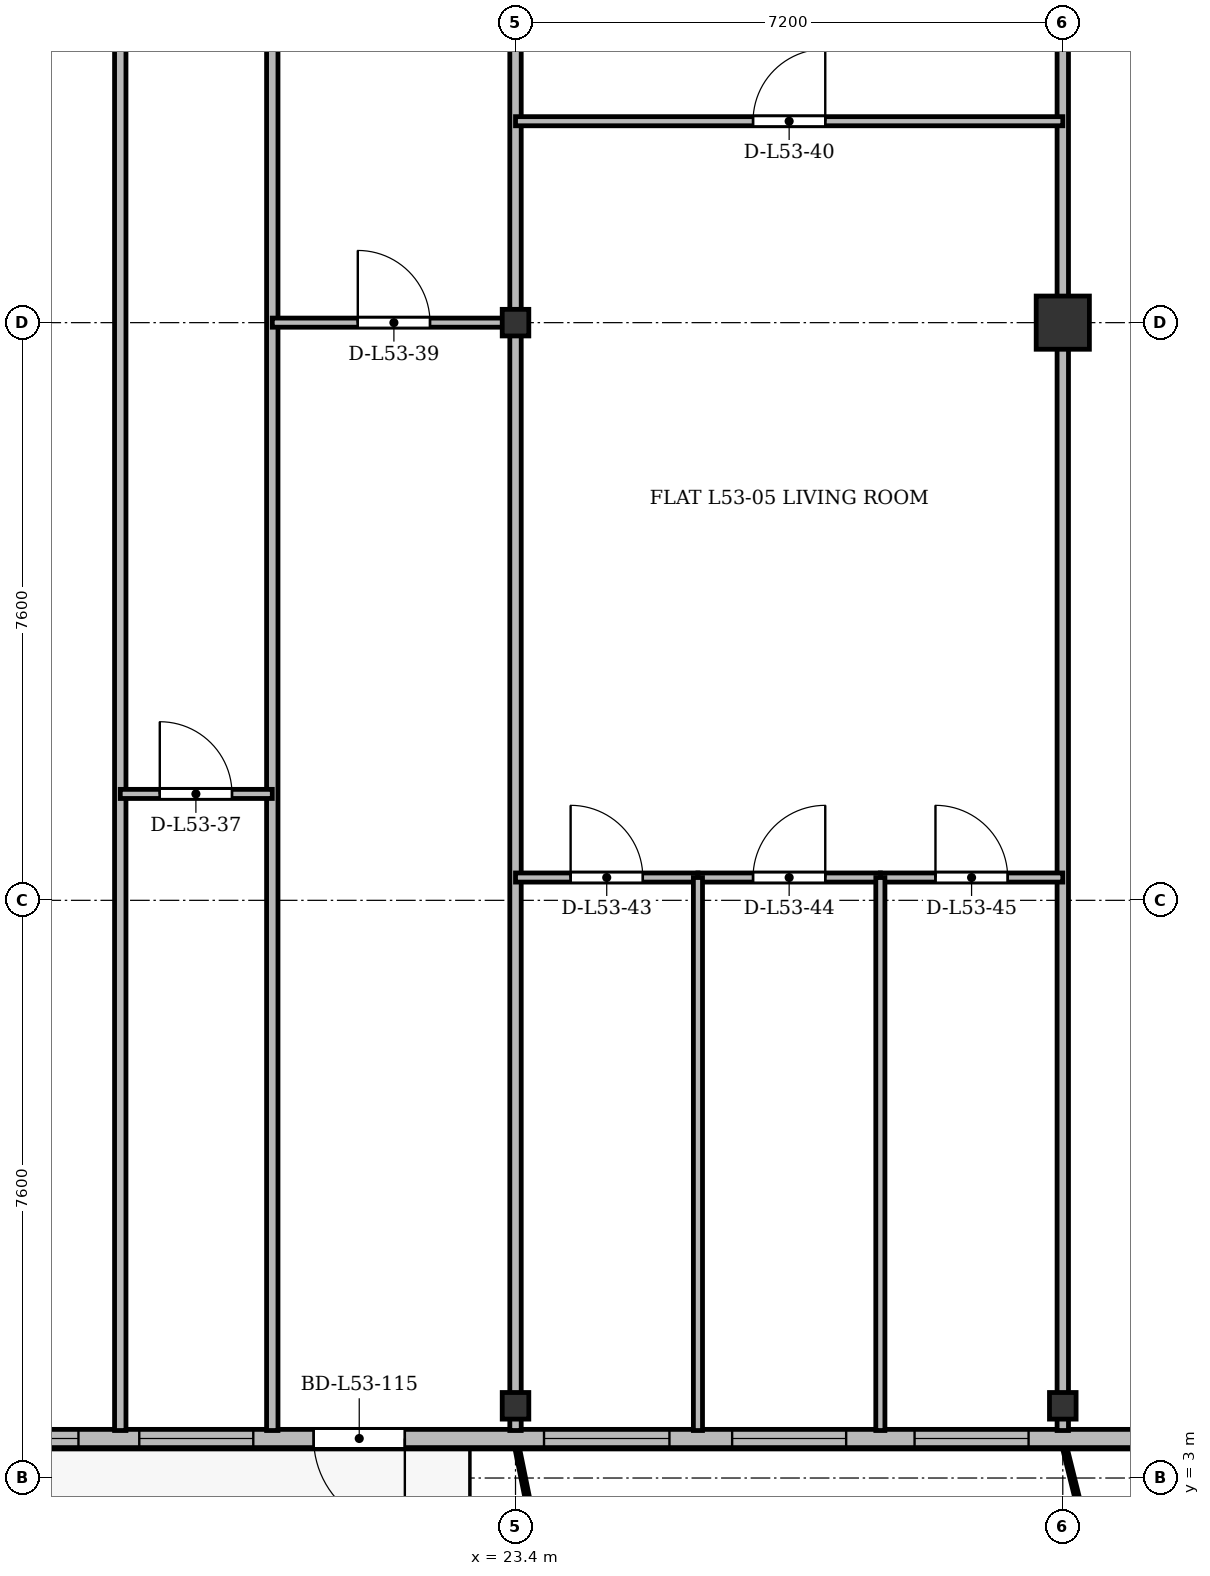
"""IFC4 building model, lengths in metres.
Left out: names, types, materials, properties, quantities, classifications, styles, units other than length and angle.
Written with IfcOpenShell. Run it as: python <this file> out.ifc"""

import sys

from ifc_helpers import new_model, si_unit, direction, frame, frame_2d, origin, origin_2d, place, context, subcontext, project, spatial, rectangle, i_section, extrude, source, transform, mapped, element, fill, save


model = new_model("IFC4")
c1 = context("Model", 3, precision=1e-05, world=origin(), true_north=direction((0.0, 1.0)))
c2 = subcontext(c1, "Body", "Model", "MODEL_VIEW")
j1 = project(units=[si_unit("LENGTHUNIT", "METRE"), si_unit("PLANEANGLEUNIT", "RADIAN")], contexts=[c1])
p1 = place(None, origin())
s1 = spatial("IfcSite", under=j1, at=p1, CompositionType="ELEMENT")
p2 = place(p1, origin())
s2 = spatial("IfcBuilding", under=s1, at=p2, CompositionType="ELEMENT")
p3 = place(p2, frame((0.0, 0.0, 204.9)))
s3 = spatial("IfcBuildingStorey", under=s2, at=p3, CompositionType="ELEMENT", Elevation=204.9)
m1 = source(origin(), c2, "Body", "SweptSolid", [
    extrude(i_section(OverallWidth=0.35, OverallDepth=0.35, WebThickness=0.018, FlangeThickness=0.028, at=origin_2d()), origin(), (0.0, 0.0, 1.0), 3.6),
])
for number, where, z_axis, x_axis in (
    (1, (23.4, 3.95, 0.0), (0.0, 0.0, 1.0), (1.0, 0.0, 0.0)),
    (2, (23.4, 18.2, 0.0), (0.0, 0.0, 1.0), (1.0, 0.0, 0.0)),
    (3, (30.6, 3.95, 0.0), (0.0, 0.0, 1.0), (1.0, 0.0, 0.0)),
):
    element("IfcColumn", number, at=place(p3, frame(where, z_axis=z_axis, x_axis=x_axis)), inside=s3, PredefinedType="COLUMN", context=c2, shape_type="MappedRepresentation", body=[
        mapped(m1, transform((0.0, 0.0, 0.0), x_axis=(1.0, 0.0, 0.0), y_axis=(0.0, 1.0, 0.0), z_axis=(0.0, 0.0, 1.0), scale=1.0)),
    ])
m2 = source(origin(), c2, "Body", "SweptSolid", [
    extrude(rectangle(XDim=0.7, YDim=0.7, at=origin_2d()), origin(), (0.0, 0.0, 1.0), 3.6),
])
p4 = place(p3, frame((30.6, 18.2, 0.0), z_axis=(0.0, 0.0, 1.0), x_axis=(1.0, 0.0, 0.0)))
e4 = element("IfcColumn", 4, at=p4, inside=s3, PredefinedType="COLUMN", context=c2, shape_type="MappedRepresentation", body=[
    mapped(m2, transform((0.0, 0.0, 0.0), x_axis=(1.0, 0.0, 0.0), y_axis=(0.0, 1.0, 0.0), z_axis=(0.0, 0.0, 1.0), scale=1.0)),
])
p5 = place(p3, frame((63.4, 3.52, 0.0), z_axis=(0.0, 0.0, 1.0), x_axis=(-1.0, 0.0, 0.0)))
e5 = element("IfcWall", 5, at=p5, inside=s3, PredefinedType="SOLIDWALL", context=c2, shape_type="SweptSolid", body=[
    extrude(rectangle(XDim=52.4, YDim=0.24, at=frame_2d((26.2, 0.0))), origin(), (0.0, 0.0, 1.0), 3.36),
])
p6 = place(p5, frame((1.345, 0.0, 0.9)))
e6 = element("IfcOpeningElement", 6, at=p6, cuts=e5, PredefinedType="OPENING", context=c2, shape_type="SweptSolid", body=[
    extrude(rectangle(XDim=2.0, YDim=1.95, at=frame_2d((1.0, 0.975))), frame((0.0, 0.13, 0.0), z_axis=(0.0, -1.0, 0.0), x_axis=(1.0, 0.0, 0.0)), (0.0, 0.0, 1.0), 0.26),
])
p7 = place(p5, frame((5.075, 0.0, 0.9)))
e7 = element("IfcOpeningElement", 7, at=p7, cuts=e5, PredefinedType="OPENING", context=c2, shape_type="SweptSolid", body=[
    extrude(rectangle(XDim=1.65, YDim=1.85, at=frame_2d((0.825, 0.925))), frame((0.0, 0.13, 0.0), z_axis=(0.0, -1.0, 0.0), x_axis=(1.0, 0.0, 0.0)), (0.0, 0.0, 1.0), 0.26),
])
p8 = place(p5, frame((7.45, 0.0, 0.9)))
e8 = element("IfcOpeningElement", 8, at=p8, cuts=e5, PredefinedType="OPENING", context=c2, shape_type="SweptSolid", body=[
    extrude(rectangle(XDim=1.5, YDim=1.75, at=frame_2d((0.75, 0.875))), frame((0.0, 0.13, 0.0), z_axis=(0.0, -1.0, 0.0), x_axis=(1.0, 0.0, 0.0)), (0.0, 0.0, 1.0), 0.26),
])
p9 = place(p5, frame((9.7, 0.0, 0.9)))
e9 = element("IfcOpeningElement", 9, at=p9, cuts=e5, PredefinedType="OPENING", context=c2, shape_type="SweptSolid", body=[
    extrude(rectangle(XDim=2.2, YDim=1.8, at=frame_2d((1.1, 0.9))), frame((0.0, 0.13, 0.0), z_axis=(0.0, -1.0, 0.0), x_axis=(1.0, 0.0, 0.0)), (0.0, 0.0, 1.0), 0.26),
])
p10 = place(p5, frame((14.217, 0.0, 0.0)))
e10 = element("IfcOpeningElement", 10, at=p10, cuts=e5, PredefinedType="OPENING", context=c2, shape_type="SweptSolid", body=[
    extrude(rectangle(XDim=1.2, YDim=2.2, at=frame_2d((0.6, 1.1))), frame((0.0, 0.13, 0.0), z_axis=(0.0, -1.0, 0.0), x_axis=(1.0, 0.0, 0.0)), (0.0, 0.0, 1.0), 0.26),
])
p11 = place(p5, frame((19.934, 0.0, 0.9)))
e11 = element("IfcOpeningElement", 11, at=p11, cuts=e5, PredefinedType="OPENING", context=c2, shape_type="SweptSolid", body=[
    extrude(rectangle(XDim=2.0, YDim=1.95, at=frame_2d((1.0, 0.975))), frame((0.0, 0.13, 0.0), z_axis=(0.0, -1.0, 0.0), x_axis=(1.0, 0.0, 0.0)), (0.0, 0.0, 1.0), 0.26),
])
p12 = place(p5, frame((22.775, 0.0, 0.9)))
e12 = element("IfcOpeningElement", 12, at=p12, cuts=e5, PredefinedType="OPENING", context=c2, shape_type="SweptSolid", body=[
    extrude(rectangle(XDim=1.65, YDim=1.85, at=frame_2d((0.825, 0.925))), frame((0.0, 0.13, 0.0), z_axis=(0.0, -1.0, 0.0), x_axis=(1.0, 0.0, 0.0)), (0.0, 0.0, 1.0), 0.26),
])
p13 = place(p5, frame((25.367, 0.0, 0.9)))
e13 = element("IfcOpeningElement", 13, at=p13, cuts=e5, PredefinedType="OPENING", context=c2, shape_type="SweptSolid", body=[
    extrude(rectangle(XDim=1.8, YDim=1.8, at=frame_2d((0.9, 0.9))), frame((0.0, 0.13, 0.0), z_axis=(0.0, -1.0, 0.0), x_axis=(1.0, 0.0, 0.0)), (0.0, 0.0, 1.0), 0.26),
])
p14 = place(p5, frame((29.1, 0.0, 0.9)))
e14 = element("IfcOpeningElement", 14, at=p14, cuts=e5, PredefinedType="OPENING", context=c2, shape_type="SweptSolid", body=[
    extrude(rectangle(XDim=2.2, YDim=1.8, at=frame_2d((1.1, 0.9))), frame((0.0, 0.13, 0.0), z_axis=(0.0, -1.0, 0.0), x_axis=(1.0, 0.0, 0.0)), (0.0, 0.0, 1.0), 0.26),
])
p15 = place(p5, frame((33.25, 0.0, 0.9)))
e15 = element("IfcOpeningElement", 15, at=p15, cuts=e5, PredefinedType="OPENING", context=c2, shape_type="SweptSolid", body=[
    extrude(rectangle(XDim=1.5, YDim=1.75, at=frame_2d((0.75, 0.875))), frame((0.0, 0.13, 0.0), z_axis=(0.0, -1.0, 0.0), x_axis=(1.0, 0.0, 0.0)), (0.0, 0.0, 1.0), 0.26),
])
p16 = place(p5, frame((35.65, 0.0, 0.9)))
e16 = element("IfcOpeningElement", 16, at=p16, cuts=e5, PredefinedType="OPENING", context=c2, shape_type="SweptSolid", body=[
    extrude(rectangle(XDim=1.5, YDim=1.75, at=frame_2d((0.75, 0.875))), frame((0.0, 0.13, 0.0), z_axis=(0.0, -1.0, 0.0), x_axis=(1.0, 0.0, 0.0)), (0.0, 0.0, 1.0), 0.26),
])
p17 = place(p5, frame((37.975, 0.0, 0.9)))
e17 = element("IfcOpeningElement", 17, at=p17, cuts=e5, PredefinedType="OPENING", context=c2, shape_type="SweptSolid", body=[
    extrude(rectangle(XDim=1.65, YDim=1.85, at=frame_2d((0.825, 0.925))), frame((0.0, 0.13, 0.0), z_axis=(0.0, -1.0, 0.0), x_axis=(1.0, 0.0, 0.0)), (0.0, 0.0, 1.0), 0.26),
])
p18 = place(p5, frame((41.456, 0.0, 0.0)))
e18 = element("IfcOpeningElement", 18, at=p18, cuts=e5, PredefinedType="OPENING", context=c2, shape_type="SweptSolid", body=[
    extrude(rectangle(XDim=1.2, YDim=2.2, at=frame_2d((0.6, 1.1))), frame((0.0, 0.13, 0.0), z_axis=(0.0, -1.0, 0.0), x_axis=(1.0, 0.0, 0.0)), (0.0, 0.0, 1.0), 0.26),
])
p19 = place(p5, frame((43.45, 0.0, 0.9)))
e19 = element("IfcOpeningElement", 19, at=p19, cuts=e5, PredefinedType="OPENING", context=c2, shape_type="SweptSolid", body=[
    extrude(rectangle(XDim=1.5, YDim=1.75, at=frame_2d((0.75, 0.875))), frame((0.0, 0.13, 0.0), z_axis=(0.0, -1.0, 0.0), x_axis=(1.0, 0.0, 0.0)), (0.0, 0.0, 1.0), 0.26),
])
p20 = place(p5, frame((45.75, 0.0, 0.9)))
e20 = element("IfcOpeningElement", 20, at=p20, cuts=e5, PredefinedType="OPENING", context=c2, shape_type="SweptSolid", body=[
    extrude(rectangle(XDim=1.5, YDim=1.75, at=frame_2d((0.75, 0.875))), frame((0.0, 0.13, 0.0), z_axis=(0.0, -1.0, 0.0), x_axis=(1.0, 0.0, 0.0)), (0.0, 0.0, 1.0), 0.26),
])
p21 = place(p5, frame((49.055, 0.0, 0.9)))
e21 = element("IfcOpeningElement", 21, at=p21, cuts=e5, PredefinedType="OPENING", context=c2, shape_type="SweptSolid", body=[
    extrude(rectangle(XDim=2.0, YDim=1.95, at=frame_2d((1.0, 0.975))), frame((0.0, 0.13, 0.0), z_axis=(0.0, -1.0, 0.0), x_axis=(1.0, 0.0, 0.0)), (0.0, 0.0, 1.0), 0.26),
])
for number, where, z_axis, x_axis in (
    (22, (23.4, 3.625, 0.0), (0.0, 0.0, 1.0), (0.0, 1.0, 0.0)),
    (23, (30.6, 3.625, 0.0), (0.0, 0.0, 1.0), (0.0, 1.0, 0.0)),
):
    element("IfcWall", number, at=place(p3, frame(where, z_axis=z_axis, x_axis=x_axis)), inside=s3, PredefinedType="PARTITIONING", context=c2, shape_type="SweptSolid", body=[
        extrude(rectangle(XDim=27.175, YDim=0.15, at=frame_2d((13.587, 0.0))), origin(), (0.0, 0.0, 1.0), 2.86),
    ])
for number, where, z_axis, x_axis in (
    (24, (18.2, 3.625, 0.0), (0.0, 0.0, 1.0), (0.0, 1.0, 0.0)),
    (25, (20.2, 3.625, 0.0), (0.0, 0.0, 1.0), (0.0, 1.0, 0.0)),
):
    element("IfcWall", number, at=place(p3, frame(where, z_axis=z_axis, x_axis=x_axis)), inside=s3, PredefinedType="PARTITIONING", context=c2, shape_type="SweptSolid", body=[
        extrude(rectangle(XDim=27.175, YDim=0.15, at=frame_2d((13.587, 0.0))), origin(), (0.0, 0.0, 1.0), 2.91),
    ])
p22 = place(p3, frame((18.2, 12.0, 0.0), z_axis=(0.0, 0.0, 1.0), x_axis=(1.0, 0.0, 0.0)))
e26 = element("IfcWall", 26, at=p22, inside=s3, PredefinedType="PARTITIONING", context=c2, shape_type="SweptSolid", body=[
    extrude(rectangle(XDim=2.0, YDim=0.12, at=frame_2d((1.0, 0.0))), origin(), (0.0, 0.0, 1.0), 3.36),
])
p23 = place(p22, frame((0.52, 0.0, 0.0)))
e27 = element("IfcOpeningElement", 27, at=p23, cuts=e26, PredefinedType="OPENING", context=c2, shape_type="SweptSolid", body=[
    extrude(rectangle(XDim=0.95, YDim=2.15, at=frame_2d((0.475, 1.075))), frame((0.0, 0.07, 0.0), z_axis=(0.0, -1.0, 0.0), x_axis=(1.0, 0.0, 0.0)), (0.0, 0.0, 1.0), 0.14),
])
p24 = place(p3, frame((20.2, 18.2, 0.0), z_axis=(0.0, 0.0, 1.0), x_axis=(1.0, 0.0, 0.0)))
e28 = element("IfcWall", 28, at=p24, inside=s3, PredefinedType="PARTITIONING", context=c2, shape_type="SweptSolid", body=[
    extrude(rectangle(XDim=3.2, YDim=0.12, at=frame_2d((1.6, 0.0))), origin(), (0.0, 0.0, 1.0), 2.91),
])
p25 = place(p24, frame((1.125, 0.0, 0.0)))
e29 = element("IfcOpeningElement", 29, at=p25, cuts=e28, PredefinedType="OPENING", context=c2, shape_type="SweptSolid", body=[
    extrude(rectangle(XDim=0.95, YDim=2.15, at=frame_2d((0.475, 1.075))), frame((0.0, 0.07, 0.0), z_axis=(0.0, -1.0, 0.0), x_axis=(1.0, 0.0, 0.0)), (0.0, 0.0, 1.0), 0.14),
])
p26 = place(p3, frame((23.4, 20.85, 0.0), z_axis=(0.0, 0.0, 1.0), x_axis=(1.0, 0.0, 0.0)))
e30 = element("IfcWall", 30, at=p26, inside=s3, PredefinedType="PARTITIONING", context=c2, shape_type="SweptSolid", body=[
    extrude(rectangle(XDim=7.2, YDim=0.12, at=frame_2d((3.6, 0.0))), origin(), (0.0, 0.0, 1.0), 2.86),
])
p27 = place(p26, frame((3.125, 0.0, 0.0)))
e31 = element("IfcOpeningElement", 31, at=p27, cuts=e30, PredefinedType="OPENING", context=c2, shape_type="SweptSolid", body=[
    extrude(rectangle(XDim=0.95, YDim=2.15, at=frame_2d((0.475, 1.075))), frame((0.0, 0.07, 0.0), z_axis=(0.0, -1.0, 0.0), x_axis=(1.0, 0.0, 0.0)), (0.0, 0.0, 1.0), 0.14),
])
p28 = place(p3, frame((23.4, 10.9, 0.0), z_axis=(0.0, 0.0, 1.0), x_axis=(1.0, 0.0, 0.0)))
e32 = element("IfcWall", 32, at=p28, inside=s3, PredefinedType="PARTITIONING", context=c2, shape_type="SweptSolid", body=[
    extrude(rectangle(XDim=2.4, YDim=0.12, at=frame_2d((1.2, 0.0))), origin(), (0.0, 0.0, 1.0), 2.86),
])
p29 = place(p28, frame((0.725, 0.0, 0.0)))
e33 = element("IfcOpeningElement", 33, at=p29, cuts=e32, PredefinedType="OPENING", context=c2, shape_type="SweptSolid", body=[
    extrude(rectangle(XDim=0.95, YDim=2.15, at=frame_2d((0.475, 1.075))), frame((0.0, 0.07, 0.0), z_axis=(0.0, -1.0, 0.0), x_axis=(1.0, 0.0, 0.0)), (0.0, 0.0, 1.0), 0.14),
])
p30 = place(p3, frame((25.8, 10.9, 0.0), z_axis=(0.0, 0.0, 1.0), x_axis=(1.0, 0.0, 0.0)))
e34 = element("IfcWall", 34, at=p30, inside=s3, PredefinedType="PARTITIONING", context=c2, shape_type="SweptSolid", body=[
    extrude(rectangle(XDim=2.4, YDim=0.12, at=frame_2d((1.2, 0.0))), origin(), (0.0, 0.0, 1.0), 3.36),
])
p31 = place(p30, frame((0.725, 0.0, 0.0)))
e35 = element("IfcOpeningElement", 35, at=p31, cuts=e34, PredefinedType="OPENING", context=c2, shape_type="SweptSolid", body=[
    extrude(rectangle(XDim=0.95, YDim=2.15, at=frame_2d((0.475, 1.075))), frame((0.0, 0.07, 0.0), z_axis=(0.0, -1.0, 0.0), x_axis=(1.0, 0.0, 0.0)), (0.0, 0.0, 1.0), 0.14),
])
p32 = place(p3, frame((25.8, 3.625, 0.0), z_axis=(0.0, 0.0, 1.0), x_axis=(0.0, 1.0, 0.0)))
e36 = element("IfcWall", 36, at=p32, inside=s3, PredefinedType="PARTITIONING", context=c2, shape_type="SweptSolid", body=[
    extrude(rectangle(XDim=7.275, YDim=0.12, at=frame_2d((3.637, 0.0))), origin(), (0.0, 0.0, 1.0), 2.91),
])
p33 = place(p3, frame((28.2, 10.9, 0.0), z_axis=(0.0, 0.0, 1.0), x_axis=(1.0, 0.0, 0.0)))
e37 = element("IfcWall", 37, at=p33, inside=s3, PredefinedType="PARTITIONING", context=c2, shape_type="SweptSolid", body=[
    extrude(rectangle(XDim=2.4, YDim=0.12, at=frame_2d((1.2, 0.0))), origin(), (0.0, 0.0, 1.0), 2.86),
])
p34 = place(p33, frame((0.725, 0.0, 0.0)))
e38 = element("IfcOpeningElement", 38, at=p34, cuts=e37, PredefinedType="OPENING", context=c2, shape_type="SweptSolid", body=[
    extrude(rectangle(XDim=0.95, YDim=2.15, at=frame_2d((0.475, 1.075))), frame((0.0, 0.07, 0.0), z_axis=(0.0, -1.0, 0.0), x_axis=(1.0, 0.0, 0.0)), (0.0, 0.0, 1.0), 0.14),
])
p35 = place(p3, frame((28.2, 3.625, 0.0), z_axis=(0.0, 0.0, 1.0), x_axis=(0.0, 1.0, 0.0)))
e39 = element("IfcWall", 39, at=p35, inside=s3, PredefinedType="PARTITIONING", context=c2, shape_type="SweptSolid", body=[
    extrude(rectangle(XDim=7.275, YDim=0.12, at=frame_2d((3.637, 0.0))), origin(), (0.0, 0.0, 1.0), 2.91),
])
m3 = source(origin(), c2, "Body", "SweptSolid", [
    extrude(rectangle(XDim=1.5, YDim=1.75, at=frame_2d((0.75, 0.875))), frame((0.0, 0.03, 0.0), z_axis=(0.0, -1.0, 0.0), x_axis=(1.0, 0.0, 0.0)), (0.0, 0.0, 1.0), 0.06),
])
p36 = place(p15, origin())
e40 = element("IfcWindow", 40, at=p36, inside=s3, PartitioningType="SINGLE_PANEL", PredefinedType="WINDOW", context=c2, shape_type="MappedRepresentation", body=[
    mapped(m3, transform((0.0, 0.0, 0.0), x_axis=(1.0, 0.0, 0.0), y_axis=(0.0, 1.0, 0.0), z_axis=(0.0, 0.0, 1.0), scale=1.0)),
])
fill(e15, e40)
p37 = place(p16, origin())
e41 = element("IfcWindow", 41, at=p37, inside=s3, PartitioningType="SINGLE_PANEL", PredefinedType="WINDOW", context=c2, shape_type="MappedRepresentation", body=[
    mapped(m3, transform((0.0, 0.0, 0.0), x_axis=(1.0, 0.0, 0.0), y_axis=(0.0, 1.0, 0.0), z_axis=(0.0, 0.0, 1.0), scale=1.0)),
])
fill(e16, e41)
m4 = source(origin(), c2, "Body", "SweptSolid", [
    extrude(rectangle(XDim=1.65, YDim=1.85, at=frame_2d((0.825, 0.925))), frame((0.0, 0.03, 0.0), z_axis=(0.0, -1.0, 0.0), x_axis=(1.0, 0.0, 0.0)), (0.0, 0.0, 1.0), 0.06),
])
p38 = place(p17, origin())
e42 = element("IfcWindow", 42, at=p38, inside=s3, PartitioningType="SINGLE_PANEL", PredefinedType="WINDOW", context=c2, shape_type="MappedRepresentation", body=[
    mapped(m4, transform((0.0, 0.0, 0.0), x_axis=(1.0, 0.0, 0.0), y_axis=(0.0, 1.0, 0.0), z_axis=(0.0, 0.0, 1.0), scale=1.0)),
])
fill(e17, e42)
m5 = source(origin(), c2, "Body", "SweptSolid", [
    extrude(rectangle(XDim=1.2, YDim=2.2, at=frame_2d((0.6, 1.1))), frame((0.0, 0.025, 0.0), z_axis=(0.0, -1.0, 0.0), x_axis=(1.0, 0.0, 0.0)), (0.0, 0.0, 1.0), 0.05),
])
p39 = place(p18, origin())
e43 = element("IfcDoor", 43, at=p39, inside=s3, OperationType="SINGLE_SWING_LEFT", PredefinedType="DOOR", context=c2, shape_type="MappedRepresentation", body=[
    mapped(m5, transform((0.0, 0.0, 0.0), x_axis=(1.0, 0.0, 0.0), y_axis=(0.0, 1.0, 0.0), z_axis=(0.0, 0.0, 1.0), scale=1.0)),
])
fill(e18, e43)
p40 = place(p19, origin())
e44 = element("IfcWindow", 44, at=p40, inside=s3, PartitioningType="SINGLE_PANEL", PredefinedType="WINDOW", context=c2, shape_type="MappedRepresentation", body=[
    mapped(m3, transform((0.0, 0.0, 0.0), x_axis=(1.0, 0.0, 0.0), y_axis=(0.0, 1.0, 0.0), z_axis=(0.0, 0.0, 1.0), scale=1.0)),
])
fill(e19, e44)
p41 = place(p20, origin())
e45 = element("IfcWindow", 45, at=p41, inside=s3, PartitioningType="SINGLE_PANEL", PredefinedType="WINDOW", context=c2, shape_type="MappedRepresentation", body=[
    mapped(m3, transform((0.0, 0.0, 0.0), x_axis=(1.0, 0.0, 0.0), y_axis=(0.0, 1.0, 0.0), z_axis=(0.0, 0.0, 1.0), scale=1.0)),
])
fill(e20, e45)
m6 = source(origin(), c2, "Body", "SweptSolid", [
    extrude(rectangle(XDim=0.95, YDim=2.15, at=frame_2d((0.475, 1.075))), frame((0.0, 0.025, 0.0), z_axis=(0.0, -1.0, 0.0), x_axis=(1.0, 0.0, 0.0)), (0.0, 0.0, 1.0), 0.05),
])
p42 = place(p23, origin())
e46 = element("IfcDoor", 46, at=p42, inside=s3, OperationType="SINGLE_SWING_LEFT", PredefinedType="DOOR", context=c2, shape_type="MappedRepresentation", body=[
    mapped(m6, transform((0.0, 0.0, 0.0), x_axis=(1.0, 0.0, 0.0), y_axis=(0.0, 1.0, 0.0), z_axis=(0.0, 0.0, 1.0), scale=1.0)),
])
fill(e27, e46)
p43 = place(p25, origin())
e47 = element("IfcDoor", 47, at=p43, inside=s3, OperationType="SINGLE_SWING_LEFT", PredefinedType="DOOR", context=c2, shape_type="MappedRepresentation", body=[
    mapped(m6, transform((0.0, 0.0, 0.0), x_axis=(1.0, 0.0, 0.0), y_axis=(0.0, 1.0, 0.0), z_axis=(0.0, 0.0, 1.0), scale=1.0)),
])
fill(e29, e47)
p44 = place(p27, origin())
e48 = element("IfcDoor", 48, at=p44, inside=s3, OperationType="SINGLE_SWING_RIGHT", PredefinedType="DOOR", context=c2, shape_type="MappedRepresentation", body=[
    mapped(m6, transform((0.0, 0.0, 0.0), x_axis=(1.0, 0.0, 0.0), y_axis=(0.0, 1.0, 0.0), z_axis=(0.0, 0.0, 1.0), scale=1.0)),
])
fill(e31, e48)
p45 = place(p29, origin())
e49 = element("IfcDoor", 49, at=p45, inside=s3, OperationType="SINGLE_SWING_LEFT", PredefinedType="DOOR", context=c2, shape_type="MappedRepresentation", body=[
    mapped(m6, transform((0.0, 0.0, 0.0), x_axis=(1.0, 0.0, 0.0), y_axis=(0.0, 1.0, 0.0), z_axis=(0.0, 0.0, 1.0), scale=1.0)),
])
fill(e33, e49)
p46 = place(p31, origin())
e50 = element("IfcDoor", 50, at=p46, inside=s3, OperationType="SINGLE_SWING_RIGHT", PredefinedType="DOOR", context=c2, shape_type="MappedRepresentation", body=[
    mapped(m6, transform((0.0, 0.0, 0.0), x_axis=(1.0, 0.0, 0.0), y_axis=(0.0, 1.0, 0.0), z_axis=(0.0, 0.0, 1.0), scale=1.0)),
])
fill(e35, e50)
p47 = place(p34, origin())
e51 = element("IfcDoor", 51, at=p47, inside=s3, OperationType="SINGLE_SWING_LEFT", PredefinedType="DOOR", context=c2, shape_type="MappedRepresentation", body=[
    mapped(m6, transform((0.0, 0.0, 0.0), x_axis=(1.0, 0.0, 0.0), y_axis=(0.0, 1.0, 0.0), z_axis=(0.0, 0.0, 1.0), scale=1.0)),
])
fill(e38, e51)
save(model, sys.argv[1])
